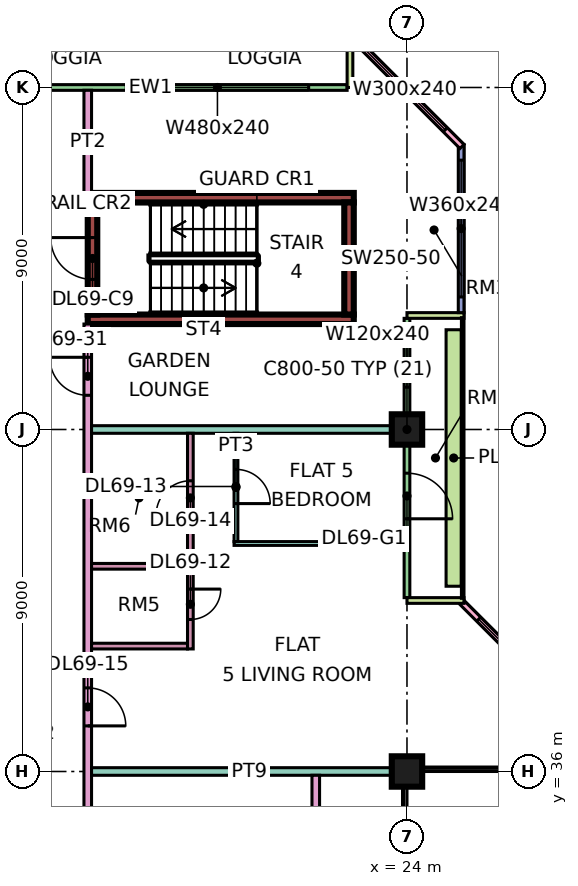
"""IFC4 building model, lengths in metres.
Left out: names, types, materials, properties, quantities, classifications, styles, units other than length and angle.
Written with IfcOpenShell. Run it as: python <this file> out.ifc"""

import sys

from ifc_helpers import new_model, si_unit, direction, frame, frame_2d, origin, origin_2d, place, context, subcontext, project, spatial, rectangle, extrude, element, fill, save


model = new_model("IFC4")
c1 = context("Model", 3, precision=1e-05, world=origin(), true_north=direction((0.0, 1.0)))
c2 = subcontext(c1, "Body", "Model", "MODEL_VIEW")
j1 = project(units=[si_unit("LENGTHUNIT", "METRE"), si_unit("PLANEANGLEUNIT", "RADIAN")], contexts=[c1])
p1 = place(None, origin())
s1 = spatial("IfcSite", under=j1, at=p1, CompositionType="ELEMENT")
p2 = place(p1, origin())
s2 = spatial("IfcBuilding", under=s1, at=p2, CompositionType="ELEMENT")
p3 = place(p2, frame((0.0, 0.0, 295.9)))
s3 = spatial("IfcBuildingStorey", under=s2, at=p3, CompositionType="ELEMENT", Elevation=295.9)
for number, where, z_axis, x_axis in (
    (1, (24.0, 36.0, 0.0), (0.0, 0.0, 1.0), (1.0, 0.0, 0.0)),
    (2, (24.0, 45.0, 0.0), (0.0, 0.0, 1.0), (1.0, 0.0, 0.0)),
):
    element("IfcColumn", number, at=place(p3, frame(where, z_axis=z_axis, x_axis=x_axis)), inside=s3, PredefinedType="COLUMN", context=c2, shape_type="SweptSolid", body=[
        extrude(rectangle(XDim=0.8, YDim=0.8, at=origin_2d()), origin(), (0.0, 0.0, 1.0), 3.75),
    ])
for number, where, z_axis, x_axis in (
    (3, (15.6, 47.9, 0.0), (0.0, 0.0, 1.0), (1.0, 0.0, 0.0)),
    (4, (15.6, 51.1, 0.0), (0.0, 0.0, 1.0), (1.0, 0.0, 0.0)),
):
    element("IfcWall", number, at=place(p3, frame(where, z_axis=z_axis, x_axis=x_axis)), inside=s3, PredefinedType="SHEAR", context=c2, shape_type="SweptSolid", body=[
        extrude(rectangle(XDim=7.0, YDim=0.25, at=frame_2d((3.5, 0.0))), origin(), (0.0, 0.0, 1.0), 3.75),
    ])
p4 = place(p3, frame((15.725, 48.025, 0.0), z_axis=(0.0, 0.0, 1.0), x_axis=(0.0, 1.0, 0.0)))
e5 = element("IfcWall", 5, at=p4, inside=s3, PredefinedType="SHEAR", context=c2, shape_type="SweptSolid", body=[
    extrude(rectangle(XDim=2.95, YDim=0.25, at=frame_2d((1.475, 0.0))), origin(), (0.0, 0.0, 1.0), 3.75),
])
p5 = place(p4, frame((0.925, 0.0, 0.0)))
e6 = element("IfcOpeningElement", 6, at=p5, cuts=e5, PredefinedType="OPENING", context=c2, shape_type="SweptSolid", body=[
    extrude(rectangle(XDim=1.1, YDim=2.2, at=frame_2d((0.55, 1.1))), frame((0.0, 0.135, 0.0), z_axis=(0.0, -1.0, 0.0), x_axis=(1.0, 0.0, 0.0)), (0.0, 0.0, 1.0), 0.27),
])
p6 = place(p3, frame((22.475, 48.025, 0.0), z_axis=(0.0, 0.0, 1.0), x_axis=(0.0, 1.0, 0.0)))
e7 = element("IfcWall", 7, at=p6, inside=s3, PredefinedType="SHEAR", context=c2, shape_type="SweptSolid", body=[
    extrude(rectangle(XDim=2.95, YDim=0.25, at=frame_2d((1.475, 0.0))), origin(), (0.0, 0.0, 1.0), 3.75),
])
p7 = place(p3, frame((28.447, 37.447, 0.0), z_axis=(0.0, 0.0, 1.0), x_axis=(-0.707106781187, 0.707106781187, 0.0)))
e8 = element("IfcWall", 8, at=p7, inside=s3, PredefinedType="SOLIDWALL", context=c2, shape_type="SweptSolid", body=[
    extrude(rectangle(XDim=4.243, YDim=0.15, at=frame_2d((2.121, 0.0))), origin(), (0.0, 0.0, 1.0), 3.35),
])
p8 = place(p7, frame((0.621, 0.0, 0.45)))
e9 = element("IfcOpeningElement", 9, at=p8, cuts=e8, PredefinedType="OPENING", context=c2, shape_type="SweptSolid", body=[
    extrude(rectangle(XDim=3.0, YDim=2.4, at=frame_2d((1.5, 1.2))), frame((0.0, 0.085, 0.0), z_axis=(0.0, -1.0, 0.0), x_axis=(1.0, 0.0, 0.0)), (0.0, 0.0, 1.0), 0.17),
])
p9 = place(p3, frame((24.0, 40.575, 0.0), z_axis=(0.0, 0.0, 1.0), x_axis=(0.0, 1.0, 0.0)))
e10 = element("IfcWall", 10, at=p9, inside=s3, PredefinedType="SOLIDWALL", context=c2, shape_type="SweptSolid", body=[
    extrude(rectangle(XDim=7.35, YDim=0.15, at=frame_2d((3.675, 0.0))), origin(), (0.0, 0.0, 1.0), 3.35),
])
p10 = place(p9, frame((2.075, 0.0, 0.0)))
e11 = element("IfcOpeningElement", 11, at=p10, cuts=e10, PredefinedType="OPENING", context=c2, shape_type="SweptSolid", body=[
    extrude(rectangle(XDim=1.2, YDim=2.4, at=frame_2d((0.6, 1.2))), frame((0.0, 0.085, 0.0), z_axis=(0.0, -1.0, 0.0), x_axis=(1.0, 0.0, 0.0)), (0.0, 0.0, 1.0), 0.17),
])
p11 = place(p9, frame((5.538, 0.0, 0.45)))
e12 = element("IfcOpeningElement", 12, at=p11, cuts=e10, PredefinedType="OPENING", context=c2, shape_type="SweptSolid", body=[
    extrude(rectangle(XDim=1.2, YDim=2.4, at=frame_2d((0.6, 1.2))), frame((0.0, 0.085, 0.0), z_axis=(0.0, -1.0, 0.0), x_axis=(1.0, 0.0, 0.0)), (0.0, 0.0, 1.0), 0.17),
])
for number, where, z_axis, x_axis in (
    (13, (25.5, 40.5, 0.0), (0.0, 0.0, 1.0), (-1.0, 0.0, 0.0)),
    (14, (25.5, 48.0, 0.0), (0.0, 0.0, 1.0), (-1.0, 0.0, 0.0)),
):
    element("IfcWall", number, at=place(p3, frame(where, z_axis=z_axis, x_axis=x_axis)), inside=s3, PredefinedType="SOLIDWALL", context=c2, shape_type="SweptSolid", body=[
        extrude(rectangle(XDim=1.5, YDim=0.15, at=frame_2d((0.75, 0.0))), origin(), (0.0, 0.0, 1.0), 3.35),
    ])
p12 = place(p3, frame((25.425, 48.075, 0.0), z_axis=(0.0, 0.0, 1.0), x_axis=(0.0, 1.0, 0.0)))
e15 = element("IfcWall", 15, at=p12, inside=s3, PredefinedType="SOLIDWALL", context=c2, shape_type="SweptSolid", body=[
    extrude(rectangle(XDim=4.425, YDim=0.15, at=frame_2d((2.212, 0.0))), origin(), (0.0, 0.0, 1.0), 3.35),
])
p13 = place(p12, frame((0.413, 0.0, 0.45)))
e16 = element("IfcOpeningElement", 16, at=p13, cuts=e15, PredefinedType="OPENING", context=c2, shape_type="SweptSolid", body=[
    extrude(rectangle(XDim=3.6, YDim=2.4, at=frame_2d((1.8, 1.2))), frame((0.0, 0.085, 0.0), z_axis=(0.0, -1.0, 0.0), x_axis=(1.0, 0.0, 0.0)), (0.0, 0.0, 1.0), 0.17),
])
p14 = place(p3, frame((25.447, 52.447, 0.0), z_axis=(0.0, 0.0, 1.0), x_axis=(-0.707106781187, 0.707106781187, 0.0)))
e17 = element("IfcWall", 17, at=p14, inside=s3, PredefinedType="SOLIDWALL", context=c2, shape_type="SweptSolid", body=[
    extrude(rectangle(XDim=4.243, YDim=0.15, at=frame_2d((2.121, 0.0))), origin(), (0.0, 0.0, 1.0), 3.35),
])
p15 = place(p14, frame((0.621, 0.0, 0.45)))
e18 = element("IfcOpeningElement", 18, at=p15, cuts=e17, PredefinedType="OPENING", context=c2, shape_type="SweptSolid", body=[
    extrude(rectangle(XDim=3.0, YDim=2.4, at=frame_2d((1.5, 1.2))), frame((0.0, 0.085, 0.0), z_axis=(0.0, -1.0, 0.0), x_axis=(1.0, 0.0, 0.0)), (0.0, 0.0, 1.0), 0.17),
])
p16 = place(p3, frame((22.425, 54.0, 0.0), z_axis=(0.0, 0.0, 1.0), x_axis=(-1.0, 0.0, 0.0)))
e19 = element("IfcWall", 19, at=p16, inside=s3, PredefinedType="SOLIDWALL", context=c2, shape_type="SweptSolid", body=[
    extrude(rectangle(XDim=10.35, YDim=0.15, at=frame_2d((5.175, 0.0))), origin(), (0.0, 0.0, 1.0), 3.35),
])
p17 = place(p16, frame((1.012, 0.0, 0.45)))
e20 = element("IfcOpeningElement", 20, at=p17, cuts=e19, PredefinedType="OPENING", context=c2, shape_type="SweptSolid", body=[
    extrude(rectangle(XDim=4.8, YDim=2.4, at=frame_2d((2.4, 1.2))), frame((0.0, 0.085, 0.0), z_axis=(0.0, -1.0, 0.0), x_axis=(1.0, 0.0, 0.0)), (0.0, 0.0, 1.0), 0.17),
])
p18 = place(p3, frame((22.5, 55.5, 0.0), z_axis=(0.0, 0.0, 1.0), x_axis=(0.0, -1.0, 0.0)))
e21 = element("IfcWall", 21, at=p18, inside=s3, PredefinedType="SOLIDWALL", context=c2, shape_type="SweptSolid", body=[
    extrude(rectangle(XDim=1.5, YDim=0.15, at=frame_2d((0.75, 0.0))), origin(), (0.0, 0.0, 1.0), 3.35),
])
p19 = place(p3, frame((25.229, 40.875, 0.0), z_axis=(0.0, 0.0, 1.0), x_axis=(0.0, 1.0, 0.0)))
e22 = element("IfcWall", 22, at=p19, inside=s3, PredefinedType="SOLIDWALL", context=c2, shape_type="SweptSolid", body=[
    extrude(rectangle(XDim=6.75, YDim=0.4, at=frame_2d((3.375, 0.0))), origin(), (0.0, 0.0, 1.0), 0.7),
])
p20 = place(p3, frame((15.6, 20.0, 0.0), z_axis=(0.0, 0.0, 1.0), x_axis=(0.0, 1.0, 0.0)))
e23 = element("IfcWall", 23, at=p20, inside=s3, PredefinedType="PARTITIONING", context=c2, shape_type="SweptSolid", body=[
    extrude(rectangle(XDim=27.775, YDim=0.2, at=frame_2d((13.887, 0.0))), origin(), (0.0, 0.0, 1.0), 3.35),
])
p21 = place(p20, frame((6.55, 0.0, 0.0)))
e24 = element("IfcOpeningElement", 24, at=p21, cuts=e23, PredefinedType="OPENING", context=c2, shape_type="SweptSolid", body=[
    extrude(rectangle(XDim=1.0, YDim=2.1, at=frame_2d((0.5, 1.05))), frame((0.0, 0.11, 0.0), z_axis=(0.0, -1.0, 0.0), x_axis=(1.0, 0.0, 0.0)), (0.0, 0.0, 1.0), 0.22),
])
p22 = place(p20, frame((12.25, 0.0, 0.0)))
e25 = element("IfcOpeningElement", 25, at=p22, cuts=e23, PredefinedType="OPENING", context=c2, shape_type="SweptSolid", body=[
    extrude(rectangle(XDim=1.6, YDim=2.1, at=frame_2d((0.8, 1.05))), frame((0.0, 0.11, 0.0), z_axis=(0.0, -1.0, 0.0), x_axis=(1.0, 0.0, 0.0)), (0.0, 0.0, 1.0), 0.22),
])
p23 = place(p20, frame((17.2, 0.0, 0.0)))
e26 = element("IfcOpeningElement", 26, at=p23, cuts=e23, PredefinedType="OPENING", context=c2, shape_type="SweptSolid", body=[
    extrude(rectangle(XDim=1.0, YDim=2.1, at=frame_2d((0.5, 1.05))), frame((0.0, 0.11, 0.0), z_axis=(0.0, -1.0, 0.0), x_axis=(1.0, 0.0, 0.0)), (0.0, 0.0, 1.0), 0.22),
])
p24 = place(p20, frame((1.15, 0.0, 0.0)))
e27 = element("IfcOpeningElement", 27, at=p24, cuts=e23, PredefinedType="OPENING", context=c2, shape_type="SweptSolid", body=[
    extrude(rectangle(XDim=1.8, YDim=2.1, at=frame_2d((0.9, 1.05))), frame((0.0, 0.11, 0.0), z_axis=(0.0, -1.0, 0.0), x_axis=(1.0, 0.0, 0.0)), (0.0, 0.0, 1.0), 0.22),
])
p25 = place(p20, frame((25.9, 0.0, 0.0)))
e28 = element("IfcOpeningElement", 28, at=p25, cuts=e23, PredefinedType="OPENING", context=c2, shape_type="SweptSolid", body=[
    extrude(rectangle(XDim=1.0, YDim=2.1, at=frame_2d((0.5, 1.05))), frame((0.0, 0.11, 0.0), z_axis=(0.0, -1.0, 0.0), x_axis=(1.0, 0.0, 0.0)), (0.0, 0.0, 1.0), 0.22),
])
p26 = place(p3, frame((15.6, 51.225, 0.0), z_axis=(0.0, 0.0, 1.0), x_axis=(0.0, 1.0, 0.0)))
e29 = element("IfcWall", 29, at=p26, inside=s3, PredefinedType="PARTITIONING", context=c2, shape_type="SweptSolid", body=[
    extrude(rectangle(XDim=2.701, YDim=0.2, at=frame_2d((1.351, 0.0))), origin(), (0.0, 0.0, 1.0), 3.35),
])
p27 = place(p3, frame((15.7, 36.0, 0.0), z_axis=(0.0, 0.0, 1.0), x_axis=(1.0, 0.0, 0.0)))
e30 = element("IfcWall", 30, at=p27, inside=s3, PredefinedType="PARTITIONING", context=c2, shape_type="SweptSolid", body=[
    extrude(rectangle(XDim=8.3, YDim=0.2, at=frame_2d((4.15, 0.0))), origin(), (0.0, 0.0, 1.0), 3.35),
])
for number, where, z_axis, x_axis in (
    (31, (15.7, 39.3, 0.0), (0.0, 0.0, 1.0), (1.0, 0.0, 0.0)),
    (32, (15.7, 41.4, 0.0), (0.0, 0.0, 1.0), (1.0, 0.0, 0.0)),
):
    element("IfcWall", number, at=place(p3, frame(where, z_axis=z_axis, x_axis=x_axis)), inside=s3, PredefinedType="PARTITIONING", context=c2, shape_type="SweptSolid", body=[
        extrude(rectangle(XDim=2.525, YDim=0.15, at=frame_2d((1.263, 0.0))), origin(), (0.0, 0.0, 1.0), 3.35),
    ])
p28 = place(p3, frame((15.7, 45.0, 0.0), z_axis=(0.0, 0.0, 1.0), x_axis=(1.0, 0.0, 0.0)))
e33 = element("IfcWall", 33, at=p28, inside=s3, PredefinedType="PARTITIONING", context=c2, shape_type="SweptSolid", body=[
    extrude(rectangle(XDim=8.226, YDim=0.2, at=frame_2d((4.113, 0.0))), origin(), (0.0, 0.0, 1.0), 3.35),
])
p29 = place(p3, frame((18.3, 39.225, 0.0), z_axis=(0.0, 0.0, 1.0), x_axis=(0.0, 1.0, 0.0)))
e34 = element("IfcWall", 34, at=p29, inside=s3, PredefinedType="PARTITIONING", context=c2, shape_type="SweptSolid", body=[
    extrude(rectangle(XDim=5.675, YDim=0.15, at=frame_2d((2.837, 0.0))), origin(), (0.0, 0.0, 1.0), 3.35),
])
p30 = place(p29, frame((0.775, 0.0, 0.0)))
e35 = element("IfcOpeningElement", 35, at=p30, cuts=e34, PredefinedType="OPENING", context=c2, shape_type="SweptSolid", body=[
    extrude(rectangle(XDim=0.8, YDim=2.1, at=frame_2d((0.4, 1.05))), frame((0.0, 0.085, 0.0), z_axis=(0.0, -1.0, 0.0), x_axis=(1.0, 0.0, 0.0)), (0.0, 0.0, 1.0), 0.17),
])
p31 = place(p29, frame((3.525, 0.0, 0.0)))
e36 = element("IfcOpeningElement", 36, at=p31, cuts=e34, PredefinedType="OPENING", context=c2, shape_type="SweptSolid", body=[
    extrude(rectangle(XDim=0.9, YDim=2.1, at=frame_2d((0.45, 1.05))), frame((0.0, 0.085, 0.0), z_axis=(0.0, -1.0, 0.0), x_axis=(1.0, 0.0, 0.0)), (0.0, 0.0, 1.0), 0.17),
])
p32 = place(p3, frame((19.45, 42.0, 0.0), z_axis=(0.0, 0.0, 1.0), x_axis=(1.0, 0.0, 0.0)))
e37 = element("IfcWall", 37, at=p32, inside=s3, PredefinedType="PARTITIONING", context=c2, shape_type="SweptSolid", body=[
    extrude(rectangle(XDim=4.476, YDim=0.1, at=frame_2d((2.238, 0.0))), origin(), (0.0, 0.0, 1.0), 3.35),
])
p33 = place(p3, frame((19.5, 42.05, 0.0), z_axis=(0.0, 0.0, 1.0), x_axis=(0.0, 1.0, 0.0)))
e38 = element("IfcWall", 38, at=p33, inside=s3, PredefinedType="PARTITIONING", context=c2, shape_type="SweptSolid", body=[
    extrude(rectangle(XDim=2.85, YDim=0.1, at=frame_2d((1.425, 0.0))), origin(), (0.0, 0.0, 1.0), 3.35),
])
p34 = place(p33, frame((1.0, 0.0, 0.0)))
e39 = element("IfcOpeningElement", 39, at=p34, cuts=e38, PredefinedType="OPENING", context=c2, shape_type="SweptSolid", body=[
    extrude(rectangle(XDim=0.9, YDim=2.1, at=frame_2d((0.45, 1.05))), frame((0.0, 0.06, 0.0), z_axis=(0.0, -1.0, 0.0), x_axis=(1.0, 0.0, 0.0)), (0.0, 0.0, 1.0), 0.12),
])
p35 = place(p3, frame((21.6, 23.9, 0.0), z_axis=(0.0, 0.0, 1.0), x_axis=(0.0, 1.0, 0.0)))
e40 = element("IfcWall", 40, at=p35, inside=s3, PredefinedType="PARTITIONING", context=c2, shape_type="SweptSolid", body=[
    extrude(rectangle(XDim=12.0, YDim=0.2, at=frame_2d((6.0, 0.0))), origin(), (0.0, 0.0, 1.0), 3.35),
])
p36 = place(p8, origin())
e41 = element("IfcWindow", 41, at=p36, inside=s3, PartitioningType="SINGLE_PANEL", PredefinedType="WINDOW", context=c2, shape_type="SweptSolid", body=[
    extrude(rectangle(XDim=3.0, YDim=2.4, at=frame_2d((1.5, 1.2))), frame((0.0, 0.03, 0.0), z_axis=(0.0, -1.0, 0.0), x_axis=(1.0, 0.0, 0.0)), (0.0, 0.0, 1.0), 0.06),
])
fill(e9, e41)
p37 = place(p10, frame((1.2, 0.0, 0.0), z_axis=(0.0, 0.0, 1.0), x_axis=(-1.0, 0.0, 0.0)))
e42 = element("IfcDoor", 42, at=p37, inside=s3, OperationType="DOUBLE_DOOR_SINGLE_SWING", PredefinedType="DOOR", context=c2, shape_type="SweptSolid", body=[
    extrude(rectangle(XDim=1.2, YDim=2.4, at=frame_2d((0.6, 1.2))), frame((0.0, 0.025, 0.0), z_axis=(0.0, -1.0, 0.0), x_axis=(1.0, 0.0, 0.0)), (0.0, 0.0, 1.0), 0.05),
])
fill(e11, e42)
p38 = place(p11, origin())
e43 = element("IfcWindow", 43, at=p38, inside=s3, PartitioningType="SINGLE_PANEL", PredefinedType="WINDOW", context=c2, shape_type="SweptSolid", body=[
    extrude(rectangle(XDim=1.2, YDim=2.4, at=frame_2d((0.6, 1.2))), frame((0.0, 0.03, 0.0), z_axis=(0.0, -1.0, 0.0), x_axis=(1.0, 0.0, 0.0)), (0.0, 0.0, 1.0), 0.06),
])
fill(e12, e43)
p39 = place(p13, origin())
e44 = element("IfcWindow", 44, at=p39, inside=s3, PartitioningType="SINGLE_PANEL", PredefinedType="WINDOW", context=c2, shape_type="SweptSolid", body=[
    extrude(rectangle(XDim=3.6, YDim=2.4, at=frame_2d((1.8, 1.2))), frame((0.0, 0.03, 0.0), z_axis=(0.0, -1.0, 0.0), x_axis=(1.0, 0.0, 0.0)), (0.0, 0.0, 1.0), 0.06),
])
fill(e16, e44)
p40 = place(p15, origin())
e45 = element("IfcWindow", 45, at=p40, inside=s3, PartitioningType="SINGLE_PANEL", PredefinedType="WINDOW", context=c2, shape_type="SweptSolid", body=[
    extrude(rectangle(XDim=3.0, YDim=2.4, at=frame_2d((1.5, 1.2))), frame((0.0, 0.03, 0.0), z_axis=(0.0, -1.0, 0.0), x_axis=(1.0, 0.0, 0.0)), (0.0, 0.0, 1.0), 0.06),
])
fill(e18, e45)
p41 = place(p17, origin())
e46 = element("IfcWindow", 46, at=p41, inside=s3, PartitioningType="SINGLE_PANEL", PredefinedType="WINDOW", context=c2, shape_type="SweptSolid", body=[
    extrude(rectangle(XDim=4.8, YDim=2.4, at=frame_2d((2.4, 1.2))), frame((0.0, 0.03, 0.0), z_axis=(0.0, -1.0, 0.0), x_axis=(1.0, 0.0, 0.0)), (0.0, 0.0, 1.0), 0.06),
])
fill(e20, e46)
p42 = place(p5, frame((1.1, 0.0, 0.0), z_axis=(0.0, 0.0, 1.0), x_axis=(-1.0, 0.0, 0.0)))
e47 = element("IfcDoor", 47, at=p42, inside=s3, OperationType="SINGLE_SWING_RIGHT", PredefinedType="DOOR", context=c2, shape_type="SweptSolid", body=[
    extrude(rectangle(XDim=1.1, YDim=2.2, at=frame_2d((0.55, 1.1))), frame((0.0, 0.025, 0.0), z_axis=(0.0, -1.0, 0.0), x_axis=(1.0, 0.0, 0.0)), (0.0, 0.0, 1.0), 0.05),
])
fill(e6, e47)
p43 = place(p30, origin())
e48 = element("IfcDoor", 48, at=p43, inside=s3, OperationType="SINGLE_SWING_RIGHT", PredefinedType="DOOR", context=c2, shape_type="SweptSolid", body=[
    extrude(rectangle(XDim=0.8, YDim=2.1, at=frame_2d((0.4, 1.05))), frame((0.0, 0.025, 0.0), z_axis=(0.0, -1.0, 0.0), x_axis=(1.0, 0.0, 0.0)), (0.0, 0.0, 1.0), 0.05),
])
fill(e35, e48)
p44 = place(p34, frame((0.9, 0.0, 0.0), z_axis=(0.0, 0.0, 1.0), x_axis=(-1.0, 0.0, 0.0)))
e49 = element("IfcDoor", 49, at=p44, inside=s3, OperationType="SINGLE_SWING_LEFT", PredefinedType="DOOR", context=c2, shape_type="SweptSolid", body=[
    extrude(rectangle(XDim=0.9, YDim=2.1, at=frame_2d((0.45, 1.05))), frame((0.0, 0.025, 0.0), z_axis=(0.0, -1.0, 0.0), x_axis=(1.0, 0.0, 0.0)), (0.0, 0.0, 1.0), 0.05),
])
fill(e39, e49)
p45 = place(p31, origin())
e50 = element("IfcDoor", 50, at=p45, inside=s3, OperationType="SINGLE_SWING_LEFT", PredefinedType="DOOR", context=c2, shape_type="SweptSolid", body=[
    extrude(rectangle(XDim=0.9, YDim=2.1, at=frame_2d((0.45, 1.05))), frame((0.0, 0.025, 0.0), z_axis=(0.0, -1.0, 0.0), x_axis=(1.0, 0.0, 0.0)), (0.0, 0.0, 1.0), 0.05),
])
fill(e36, e50)
p46 = place(p23, frame((1.0, 0.0, 0.0), z_axis=(0.0, 0.0, 1.0), x_axis=(-1.0, 0.0, 0.0)))
e51 = element("IfcDoor", 51, at=p46, inside=s3, OperationType="SINGLE_SWING_LEFT", PredefinedType="DOOR", context=c2, shape_type="SweptSolid", body=[
    extrude(rectangle(XDim=1.0, YDim=2.1, at=frame_2d((0.5, 1.05))), frame((0.0, 0.025, 0.0), z_axis=(0.0, -1.0, 0.0), x_axis=(1.0, 0.0, 0.0)), (0.0, 0.0, 1.0), 0.05),
])
fill(e26, e51)
p47 = place(p25, frame((1.0, 0.0, 0.0), z_axis=(0.0, 0.0, 1.0), x_axis=(-1.0, 0.0, 0.0)))
e52 = element("IfcDoor", 52, at=p47, inside=s3, OperationType="SINGLE_SWING_RIGHT", PredefinedType="DOOR", context=c2, shape_type="SweptSolid", body=[
    extrude(rectangle(XDim=1.0, YDim=2.1, at=frame_2d((0.5, 1.05))), frame((0.0, 0.025, 0.0), z_axis=(0.0, -1.0, 0.0), x_axis=(1.0, 0.0, 0.0)), (0.0, 0.0, 1.0), 0.05),
])
fill(e28, e52)
save(model, sys.argv[1])
